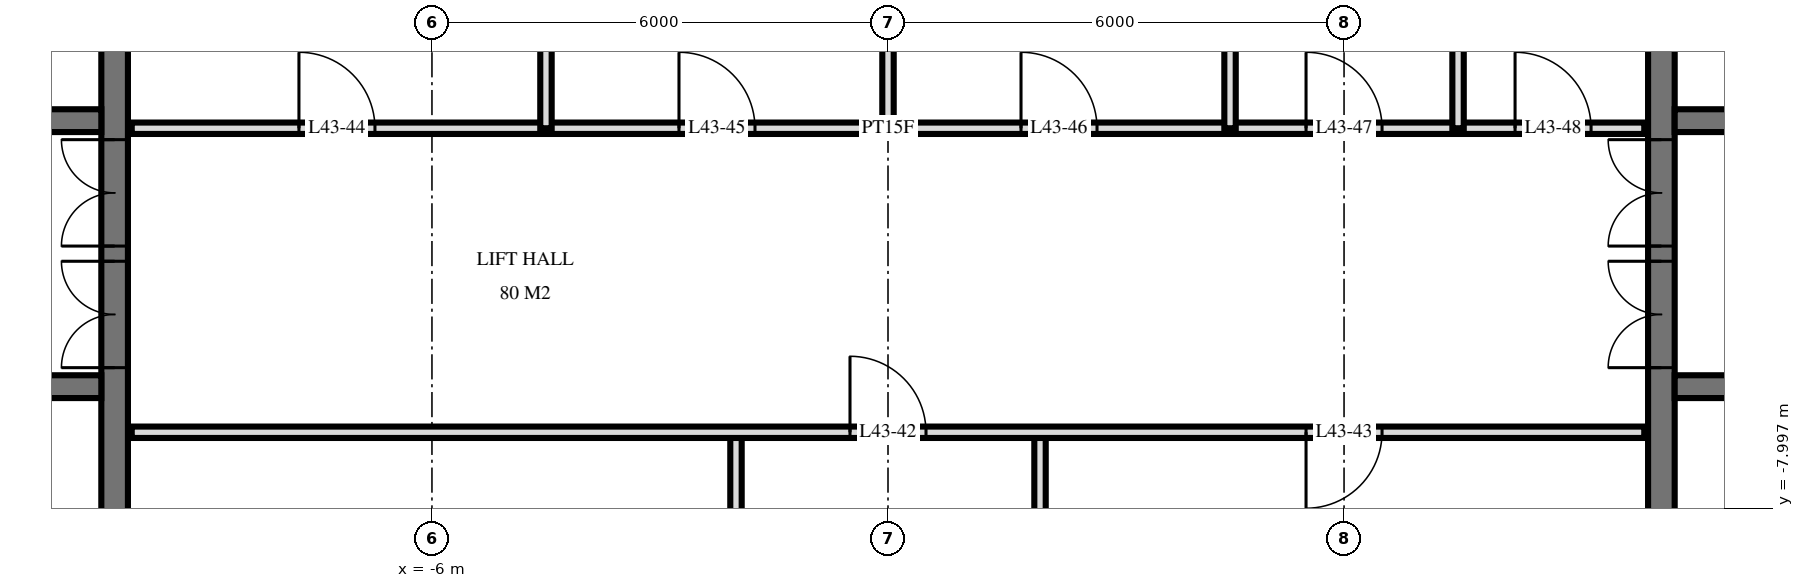
"""IFC4 building model, lengths in metres.
Left out: names, types, materials, properties, quantities, classifications, styles, units other than length and angle.
Written with IfcOpenShell. Run it as: python <this file> out.ifc"""

import sys

from ifc_helpers import new_model, si_unit, direction, frame, frame_2d, origin, place, context, subcontext, project, spatial, rectangle, extrude, element, fill, save


model = new_model("IFC4")
c1 = context("Model", 3, precision=1e-05, world=origin(), true_north=direction((0.0, 1.0)))
c2 = subcontext(c1, "Body", "Model", "MODEL_VIEW")
j1 = project(units=[si_unit("LENGTHUNIT", "METRE"), si_unit("PLANEANGLEUNIT", "RADIAN")], contexts=[c1])
p1 = place(None, origin())
s1 = spatial("IfcSite", under=j1, at=p1, CompositionType="ELEMENT")
p2 = place(p1, origin())
s2 = spatial("IfcBuilding", under=s1, at=p2, CompositionType="ELEMENT")
p3 = place(p2, frame((0.0, 0.0, 166.8)))
s3 = spatial("IfcBuildingStorey", under=s2, at=p3, CompositionType="ELEMENT", Elevation=166.8)
p4 = place(p3, frame((-10.175, -14.55, 0.0), z_axis=(0.0, 0.0, 1.0), x_axis=(0.0, 1.0, 0.0)))
e1 = element("IfcWall", 1, at=p4, inside=s3, PredefinedType="SHEAR", context=c2, shape_type="SweptSolid", body=[
    extrude(rectangle(XDim=14.1, YDim=0.35, at=frame_2d((7.05, 0.0))), origin(), (0.0, 0.0, 1.0), 3.6),
])
p5 = place(p4, frame((8.4, 0.0, 0.0)))
e2 = element("IfcOpeningElement", 2, at=p5, cuts=e1, PredefinedType="OPENING", context=c2, shape_type="SweptSolid", body=[
    extrude(rectangle(XDim=1.4, YDim=2.4, at=frame_2d((0.7, 1.2))), frame((0.0, 0.185, 0.0), z_axis=(0.0, -1.0, 0.0), x_axis=(1.0, 0.0, 0.0)), (0.0, 0.0, 1.0), 0.37),
])
p6 = place(p4, frame((10.0, 0.0, 0.0)))
e3 = element("IfcOpeningElement", 3, at=p6, cuts=e1, PredefinedType="OPENING", context=c2, shape_type="SweptSolid", body=[
    extrude(rectangle(XDim=1.4, YDim=2.4, at=frame_2d((0.7, 1.2))), frame((0.0, 0.185, 0.0), z_axis=(0.0, -1.0, 0.0), x_axis=(1.0, 0.0, 0.0)), (0.0, 0.0, 1.0), 0.37),
])
p7 = place(p4, frame((4.0, 0.0, 0.0)))
e4 = element("IfcOpeningElement", 4, at=p7, cuts=e1, PredefinedType="OPENING", context=c2, shape_type="SweptSolid", body=[
    extrude(rectangle(XDim=1.2, YDim=2.1, at=frame_2d((0.6, 1.05))), frame((0.0, 0.185, 0.0), z_axis=(0.0, -1.0, 0.0), x_axis=(1.0, 0.0, 0.0)), (0.0, 0.0, 1.0), 0.37),
])
p8 = place(p3, frame((-24.05, -2.9, 0.0), z_axis=(0.0, 0.0, 1.0), x_axis=(1.0, 0.0, 0.0)))
e5 = element("IfcWall", 5, at=p8, inside=s3, PredefinedType="SHEAR", context=c2, shape_type="SweptSolid", body=[
    extrude(rectangle(XDim=13.7, YDim=0.3, at=frame_2d((6.85, 0.0))), origin(), (0.0, 0.0, 1.0), 3.6),
])
p9 = place(p8, frame((0.55, 0.0, 0.0)))
e6 = element("IfcOpeningElement", 6, at=p9, cuts=e5, PredefinedType="OPENING", context=c2, shape_type="SweptSolid", body=[
    extrude(rectangle(XDim=1.1, YDim=2.1, at=frame_2d((0.55, 1.05))), frame((0.0, 0.16, 0.0), z_axis=(0.0, -1.0, 0.0), x_axis=(1.0, 0.0, 0.0)), (0.0, 0.0, 1.0), 0.32),
])
p10 = place(p8, frame((6.863, 0.0, 0.0)))
e7 = element("IfcOpeningElement", 7, at=p10, cuts=e5, PredefinedType="OPENING", context=c2, shape_type="SweptSolid", body=[
    extrude(rectangle(XDim=0.9, YDim=2.1, at=frame_2d((0.45, 1.05))), frame((0.0, 0.16, 0.0), z_axis=(0.0, -1.0, 0.0), x_axis=(1.0, 0.0, 0.0)), (0.0, 0.0, 1.0), 0.32),
])
p11 = place(p8, frame((5.438, 0.0, 0.0)))
e8 = element("IfcOpeningElement", 8, at=p11, cuts=e5, PredefinedType="OPENING", context=c2, shape_type="SweptSolid", body=[
    extrude(rectangle(XDim=0.9, YDim=2.1, at=frame_2d((0.45, 1.05))), frame((0.0, 0.16, 0.0), z_axis=(0.0, -1.0, 0.0), x_axis=(1.0, 0.0, 0.0)), (0.0, 0.0, 1.0), 0.32),
])
p12 = place(p8, frame((11.85, 0.0, 0.0)))
e9 = element("IfcOpeningElement", 9, at=p12, cuts=e5, PredefinedType="OPENING", context=c2, shape_type="SweptSolid", body=[
    extrude(rectangle(XDim=1.0, YDim=2.1, at=frame_2d((0.5, 1.05))), frame((0.0, 0.16, 0.0), z_axis=(0.0, -1.0, 0.0), x_axis=(1.0, 0.0, 0.0)), (0.0, 0.0, 1.0), 0.32),
])
p13 = place(p8, frame((9.562, 0.0, 0.0)))
e10 = element("IfcOpeningElement", 10, at=p13, cuts=e5, PredefinedType="OPENING", context=c2, shape_type="SweptSolid", body=[
    extrude(rectangle(XDim=1.0, YDim=2.1, at=frame_2d((0.5, 1.05))), frame((0.0, 0.16, 0.0), z_axis=(0.0, -1.0, 0.0), x_axis=(1.0, 0.0, 0.0)), (0.0, 0.0, 1.0), 0.32),
])
p14 = place(p8, frame((8.137, 0.0, 0.0)))
e11 = element("IfcOpeningElement", 11, at=p14, cuts=e5, PredefinedType="OPENING", context=c2, shape_type="SweptSolid", body=[
    extrude(rectangle(XDim=1.0, YDim=2.1, at=frame_2d((0.5, 1.05))), frame((0.0, 0.16, 0.0), z_axis=(0.0, -1.0, 0.0), x_axis=(1.0, 0.0, 0.0)), (0.0, 0.0, 1.0), 0.32),
])
p15 = place(p8, frame((3.0, 0.0, 0.0)))
e12 = element("IfcOpeningElement", 12, at=p15, cuts=e5, PredefinedType="OPENING", context=c2, shape_type="SweptSolid", body=[
    extrude(rectangle(XDim=1.0, YDim=2.1, at=frame_2d((0.5, 1.05))), frame((0.0, 0.16, 0.0), z_axis=(0.0, -1.0, 0.0), x_axis=(1.0, 0.0, 0.0)), (0.0, 0.0, 1.0), 0.32),
])
p16 = place(p3, frame((-24.05, -6.4, 0.0), z_axis=(0.0, 0.0, 1.0), x_axis=(1.0, 0.0, 0.0)))
e13 = element("IfcWall", 13, at=p16, inside=s3, PredefinedType="SHEAR", context=c2, shape_type="SweptSolid", body=[
    extrude(rectangle(XDim=13.7, YDim=0.3, at=frame_2d((6.85, 0.0))), origin(), (0.0, 0.0, 1.0), 3.6),
])
p17 = place(p16, frame((0.55, 0.0, 0.0)))
e14 = element("IfcOpeningElement", 14, at=p17, cuts=e13, PredefinedType="OPENING", context=c2, shape_type="SweptSolid", body=[
    extrude(rectangle(XDim=1.1, YDim=2.1, at=frame_2d((0.55, 1.05))), frame((0.0, 0.16, 0.0), z_axis=(0.0, -1.0, 0.0), x_axis=(1.0, 0.0, 0.0)), (0.0, 0.0, 1.0), 0.32),
])
p18 = place(p16, frame((5.8, 0.0, 0.0)))
e15 = element("IfcOpeningElement", 15, at=p18, cuts=e13, PredefinedType="OPENING", context=c2, shape_type="SweptSolid", body=[
    extrude(rectangle(XDim=1.1, YDim=2.1, at=frame_2d((0.55, 1.05))), frame((0.0, 0.16, 0.0), z_axis=(0.0, -1.0, 0.0), x_axis=(1.0, 0.0, 0.0)), (0.0, 0.0, 1.0), 0.32),
])
p19 = place(p3, frame((10.175, -14.55, 0.0), z_axis=(0.0, 0.0, 1.0), x_axis=(0.0, 1.0, 0.0)))
e16 = element("IfcWall", 16, at=p19, inside=s3, PredefinedType="SHEAR", context=c2, shape_type="SweptSolid", body=[
    extrude(rectangle(XDim=14.1, YDim=0.35, at=frame_2d((7.05, 0.0))), origin(), (0.0, 0.0, 1.0), 3.6),
])
p20 = place(p19, frame((8.4, 0.0, 0.0)))
e17 = element("IfcOpeningElement", 17, at=p20, cuts=e16, PredefinedType="OPENING", context=c2, shape_type="SweptSolid", body=[
    extrude(rectangle(XDim=1.4, YDim=2.4, at=frame_2d((0.7, 1.2))), frame((0.0, 0.185, 0.0), z_axis=(0.0, -1.0, 0.0), x_axis=(1.0, 0.0, 0.0)), (0.0, 0.0, 1.0), 0.37),
])
p21 = place(p19, frame((10.0, 0.0, 0.0)))
e18 = element("IfcOpeningElement", 18, at=p21, cuts=e16, PredefinedType="OPENING", context=c2, shape_type="SweptSolid", body=[
    extrude(rectangle(XDim=1.4, YDim=2.4, at=frame_2d((0.7, 1.2))), frame((0.0, 0.185, 0.0), z_axis=(0.0, -1.0, 0.0), x_axis=(1.0, 0.0, 0.0)), (0.0, 0.0, 1.0), 0.37),
])
p22 = place(p19, frame((4.0, 0.0, 0.0)))
e19 = element("IfcOpeningElement", 19, at=p22, cuts=e16, PredefinedType="OPENING", context=c2, shape_type="SweptSolid", body=[
    extrude(rectangle(XDim=1.2, YDim=2.1, at=frame_2d((0.6, 1.05))), frame((0.0, 0.185, 0.0), z_axis=(0.0, -1.0, 0.0), x_axis=(1.0, 0.0, 0.0)), (0.0, 0.0, 1.0), 0.37),
])
p23 = place(p3, frame((10.35, -2.9, 0.0), z_axis=(0.0, 0.0, 1.0), x_axis=(1.0, 0.0, 0.0)))
e20 = element("IfcWall", 20, at=p23, inside=s3, PredefinedType="SHEAR", context=c2, shape_type="SweptSolid", body=[
    extrude(rectangle(XDim=13.7, YDim=0.3, at=frame_2d((6.85, 0.0))), origin(), (0.0, 0.0, 1.0), 3.6),
])
p24 = place(p23, frame((12.05, 0.0, 0.0)))
e21 = element("IfcOpeningElement", 21, at=p24, cuts=e20, PredefinedType="OPENING", context=c2, shape_type="SweptSolid", body=[
    extrude(rectangle(XDim=1.1, YDim=2.1, at=frame_2d((0.55, 1.05))), frame((0.0, 0.16, 0.0), z_axis=(0.0, -1.0, 0.0), x_axis=(1.0, 0.0, 0.0)), (0.0, 0.0, 1.0), 0.32),
])
p25 = place(p23, frame((5.938, 0.0, 0.0)))
e22 = element("IfcOpeningElement", 22, at=p25, cuts=e20, PredefinedType="OPENING", context=c2, shape_type="SweptSolid", body=[
    extrude(rectangle(XDim=0.9, YDim=2.1, at=frame_2d((0.45, 1.05))), frame((0.0, 0.16, 0.0), z_axis=(0.0, -1.0, 0.0), x_axis=(1.0, 0.0, 0.0)), (0.0, 0.0, 1.0), 0.32),
])
p26 = place(p23, frame((7.363, 0.0, 0.0)))
e23 = element("IfcOpeningElement", 23, at=p26, cuts=e20, PredefinedType="OPENING", context=c2, shape_type="SweptSolid", body=[
    extrude(rectangle(XDim=0.9, YDim=2.1, at=frame_2d((0.45, 1.05))), frame((0.0, 0.16, 0.0), z_axis=(0.0, -1.0, 0.0), x_axis=(1.0, 0.0, 0.0)), (0.0, 0.0, 1.0), 0.32),
])
p27 = place(p23, frame((0.85, 0.0, 0.0)))
e24 = element("IfcOpeningElement", 24, at=p27, cuts=e20, PredefinedType="OPENING", context=c2, shape_type="SweptSolid", body=[
    extrude(rectangle(XDim=1.0, YDim=2.1, at=frame_2d((0.5, 1.05))), frame((0.0, 0.16, 0.0), z_axis=(0.0, -1.0, 0.0), x_axis=(1.0, 0.0, 0.0)), (0.0, 0.0, 1.0), 0.32),
])
p28 = place(p23, frame((3.137, 0.0, 0.0)))
e25 = element("IfcOpeningElement", 25, at=p28, cuts=e20, PredefinedType="OPENING", context=c2, shape_type="SweptSolid", body=[
    extrude(rectangle(XDim=1.0, YDim=2.1, at=frame_2d((0.5, 1.05))), frame((0.0, 0.16, 0.0), z_axis=(0.0, -1.0, 0.0), x_axis=(1.0, 0.0, 0.0)), (0.0, 0.0, 1.0), 0.32),
])
p29 = place(p23, frame((4.562, 0.0, 0.0)))
e26 = element("IfcOpeningElement", 26, at=p29, cuts=e20, PredefinedType="OPENING", context=c2, shape_type="SweptSolid", body=[
    extrude(rectangle(XDim=1.0, YDim=2.1, at=frame_2d((0.5, 1.05))), frame((0.0, 0.16, 0.0), z_axis=(0.0, -1.0, 0.0), x_axis=(1.0, 0.0, 0.0)), (0.0, 0.0, 1.0), 0.32),
])
p30 = place(p23, frame((9.7, 0.0, 0.0)))
e27 = element("IfcOpeningElement", 27, at=p30, cuts=e20, PredefinedType="OPENING", context=c2, shape_type="SweptSolid", body=[
    extrude(rectangle(XDim=1.0, YDim=2.1, at=frame_2d((0.5, 1.05))), frame((0.0, 0.16, 0.0), z_axis=(0.0, -1.0, 0.0), x_axis=(1.0, 0.0, 0.0)), (0.0, 0.0, 1.0), 0.32),
])
p31 = place(p3, frame((10.35, -6.4, 0.0), z_axis=(0.0, 0.0, 1.0), x_axis=(1.0, 0.0, 0.0)))
e28 = element("IfcWall", 28, at=p31, inside=s3, PredefinedType="SHEAR", context=c2, shape_type="SweptSolid", body=[
    extrude(rectangle(XDim=13.7, YDim=0.3, at=frame_2d((6.85, 0.0))), origin(), (0.0, 0.0, 1.0), 3.6),
])
p32 = place(p31, frame((12.05, 0.0, 0.0)))
e29 = element("IfcOpeningElement", 29, at=p32, cuts=e28, PredefinedType="OPENING", context=c2, shape_type="SweptSolid", body=[
    extrude(rectangle(XDim=1.1, YDim=2.1, at=frame_2d((0.55, 1.05))), frame((0.0, 0.16, 0.0), z_axis=(0.0, -1.0, 0.0), x_axis=(1.0, 0.0, 0.0)), (0.0, 0.0, 1.0), 0.32),
])
p33 = place(p31, frame((6.8, 0.0, 0.0)))
e30 = element("IfcOpeningElement", 30, at=p33, cuts=e28, PredefinedType="OPENING", context=c2, shape_type="SweptSolid", body=[
    extrude(rectangle(XDim=1.1, YDim=2.1, at=frame_2d((0.55, 1.05))), frame((0.0, 0.16, 0.0), z_axis=(0.0, -1.0, 0.0), x_axis=(1.0, 0.0, 0.0)), (0.0, 0.0, 1.0), 0.32),
])
for number, where, z_axis, x_axis in (
    (31, (7.5, -3.0, 0.0), (0.0, 0.0, 1.0), (0.0, 1.0, 0.0)),
    (32, (4.5, -3.0, 0.0), (0.0, 0.0, 1.0), (0.0, 1.0, 0.0)),
):
    element("IfcWall", number, at=place(p3, frame(where, z_axis=z_axis, x_axis=x_axis)), inside=s3, PredefinedType="PLUMBINGWALL", context=c2, shape_type="SweptSolid", body=[
        extrude(rectangle(XDim=4.02, YDim=0.15, at=frame_2d((2.01, 0.0))), origin(), (0.0, 0.0, 1.0), 3.32),
    ])
p34 = place(p3, frame((2.0, -11.0, 0.0), z_axis=(0.0, 0.0, 1.0), x_axis=(0.0, 1.0, 0.0)))
e33 = element("IfcWall", 33, at=p34, inside=s3, PredefinedType="PARTITIONING", context=c2, shape_type="SweptSolid", body=[
    extrude(rectangle(XDim=4.0, YDim=0.15, at=frame_2d((2.0, 0.0))), origin(), (0.0, 0.0, 1.0), 3.32),
])
p35 = place(p3, frame((0.0, -3.0, 0.0), z_axis=(0.0, 0.0, 1.0), x_axis=(0.0, 1.0, 0.0)))
e34 = element("IfcWall", 34, at=p35, inside=s3, PredefinedType="PARTITIONING", context=c2, shape_type="SweptSolid", body=[
    extrude(rectangle(XDim=4.02, YDim=0.15, at=frame_2d((2.01, 0.0))), origin(), (0.0, 0.0, 1.0), 3.32),
])
p36 = place(p3, frame((-2.0, -11.0, 0.0), z_axis=(0.0, 0.0, 1.0), x_axis=(0.0, 1.0, 0.0)))
e35 = element("IfcWall", 35, at=p36, inside=s3, PredefinedType="PARTITIONING", context=c2, shape_type="SweptSolid", body=[
    extrude(rectangle(XDim=4.0, YDim=0.15, at=frame_2d((2.0, 0.0))), origin(), (0.0, 0.0, 1.0), 3.32),
])
p37 = place(p3, frame((-4.5, -3.0, 0.0), z_axis=(0.0, 0.0, 1.0), x_axis=(0.0, 1.0, 0.0)))
e36 = element("IfcWall", 36, at=p37, inside=s3, PredefinedType="PARTITIONING", context=c2, shape_type="SweptSolid", body=[
    extrude(rectangle(XDim=4.02, YDim=0.15, at=frame_2d((2.01, 0.0))), origin(), (0.0, 0.0, 1.0), 3.32),
])
p38 = place(p3, frame((-9.95, -7.0, 0.0), z_axis=(0.0, 0.0, 1.0), x_axis=(1.0, 0.0, 0.0)))
e37 = element("IfcWall", 37, at=p38, inside=s3, PredefinedType="PARTITIONING", context=c2, shape_type="SweptSolid", body=[
    extrude(rectangle(XDim=19.9, YDim=0.15, at=frame_2d((9.95, 0.0))), origin(), (0.0, 0.0, 1.0), 3.32),
])
p39 = place(p38, frame((9.45, 0.0, 0.0)))
e38 = element("IfcOpeningElement", 38, at=p39, cuts=e37, PredefinedType="OPENING", context=c2, shape_type="SweptSolid", body=[
    extrude(rectangle(XDim=1.0, YDim=2.1, at=frame_2d((0.5, 1.05))), frame((0.0, 0.085, 0.0), z_axis=(0.0, -1.0, 0.0), x_axis=(1.0, 0.0, 0.0)), (0.0, 0.0, 1.0), 0.17),
])
p40 = place(p38, frame((15.45, 0.0, 0.0)))
e39 = element("IfcOpeningElement", 39, at=p40, cuts=e37, PredefinedType="OPENING", context=c2, shape_type="SweptSolid", body=[
    extrude(rectangle(XDim=1.0, YDim=2.1, at=frame_2d((0.5, 1.05))), frame((0.0, 0.085, 0.0), z_axis=(0.0, -1.0, 0.0), x_axis=(1.0, 0.0, 0.0)), (0.0, 0.0, 1.0), 0.17),
])
p41 = place(p3, frame((-9.95, -3.0, 0.0), z_axis=(0.0, 0.0, 1.0), x_axis=(1.0, 0.0, 0.0)))
e40 = element("IfcWall", 40, at=p41, inside=s3, PredefinedType="PARTITIONING", context=c2, shape_type="SweptSolid", body=[
    extrude(rectangle(XDim=19.9, YDim=0.15, at=frame_2d((9.95, 0.0))), origin(), (0.0, 0.0, 1.0), 3.32),
])
p42 = place(p41, frame((2.2, 0.0, 0.0)))
e41 = element("IfcOpeningElement", 41, at=p42, cuts=e40, PredefinedType="OPENING", context=c2, shape_type="SweptSolid", body=[
    extrude(rectangle(XDim=1.0, YDim=2.1, at=frame_2d((0.5, 1.05))), frame((0.0, 0.085, 0.0), z_axis=(0.0, -1.0, 0.0), x_axis=(1.0, 0.0, 0.0)), (0.0, 0.0, 1.0), 0.17),
])
p43 = place(p41, frame((7.2, 0.0, 0.0)))
e42 = element("IfcOpeningElement", 42, at=p43, cuts=e40, PredefinedType="OPENING", context=c2, shape_type="SweptSolid", body=[
    extrude(rectangle(XDim=1.0, YDim=2.1, at=frame_2d((0.5, 1.05))), frame((0.0, 0.085, 0.0), z_axis=(0.0, -1.0, 0.0), x_axis=(1.0, 0.0, 0.0)), (0.0, 0.0, 1.0), 0.17),
])
p44 = place(p41, frame((11.7, 0.0, 0.0)))
e43 = element("IfcOpeningElement", 43, at=p44, cuts=e40, PredefinedType="OPENING", context=c2, shape_type="SweptSolid", body=[
    extrude(rectangle(XDim=1.0, YDim=2.1, at=frame_2d((0.5, 1.05))), frame((0.0, 0.085, 0.0), z_axis=(0.0, -1.0, 0.0), x_axis=(1.0, 0.0, 0.0)), (0.0, 0.0, 1.0), 0.17),
])
p45 = place(p41, frame((15.45, 0.0, 0.0)))
e44 = element("IfcOpeningElement", 44, at=p45, cuts=e40, PredefinedType="OPENING", context=c2, shape_type="SweptSolid", body=[
    extrude(rectangle(XDim=1.0, YDim=2.1, at=frame_2d((0.5, 1.05))), frame((0.0, 0.085, 0.0), z_axis=(0.0, -1.0, 0.0), x_axis=(1.0, 0.0, 0.0)), (0.0, 0.0, 1.0), 0.17),
])
p46 = place(p41, frame((18.2, 0.0, 0.0)))
e45 = element("IfcOpeningElement", 45, at=p46, cuts=e40, PredefinedType="OPENING", context=c2, shape_type="SweptSolid", body=[
    extrude(rectangle(XDim=1.0, YDim=2.1, at=frame_2d((0.5, 1.05))), frame((0.0, 0.085, 0.0), z_axis=(0.0, -1.0, 0.0), x_axis=(1.0, 0.0, 0.0)), (0.0, 0.0, 1.0), 0.17),
])
p47 = place(p5, origin())
e46 = element("IfcDoor", 46, at=p47, inside=s3, OperationType="DOUBLE_DOOR_SINGLE_SWING", PredefinedType="DOOR", context=c2, shape_type="SweptSolid", body=[
    extrude(rectangle(XDim=1.4, YDim=2.4, at=frame_2d((0.7, 1.2))), frame((0.0, 0.025, 0.0), z_axis=(0.0, -1.0, 0.0), x_axis=(1.0, 0.0, 0.0)), (0.0, 0.0, 1.0), 0.05),
])
fill(e2, e46)
p48 = place(p6, origin())
e47 = element("IfcDoor", 47, at=p48, inside=s3, OperationType="DOUBLE_DOOR_SINGLE_SWING", PredefinedType="DOOR", context=c2, shape_type="SweptSolid", body=[
    extrude(rectangle(XDim=1.4, YDim=2.4, at=frame_2d((0.7, 1.2))), frame((0.0, 0.025, 0.0), z_axis=(0.0, -1.0, 0.0), x_axis=(1.0, 0.0, 0.0)), (0.0, 0.0, 1.0), 0.05),
])
fill(e3, e47)
p49 = place(p20, origin())
e48 = element("IfcDoor", 48, at=p49, inside=s3, OperationType="DOUBLE_DOOR_SINGLE_SWING", PredefinedType="DOOR", context=c2, shape_type="SweptSolid", body=[
    extrude(rectangle(XDim=1.4, YDim=2.4, at=frame_2d((0.7, 1.2))), frame((0.0, 0.025, 0.0), z_axis=(0.0, -1.0, 0.0), x_axis=(1.0, 0.0, 0.0)), (0.0, 0.0, 1.0), 0.05),
])
fill(e17, e48)
p50 = place(p21, origin())
e49 = element("IfcDoor", 49, at=p50, inside=s3, OperationType="DOUBLE_DOOR_SINGLE_SWING", PredefinedType="DOOR", context=c2, shape_type="SweptSolid", body=[
    extrude(rectangle(XDim=1.4, YDim=2.4, at=frame_2d((0.7, 1.2))), frame((0.0, 0.025, 0.0), z_axis=(0.0, -1.0, 0.0), x_axis=(1.0, 0.0, 0.0)), (0.0, 0.0, 1.0), 0.05),
])
fill(e18, e49)
p51 = place(p39, origin())
e50 = element("IfcDoor", 50, at=p51, inside=s3, OperationType="SINGLE_SWING_RIGHT", PredefinedType="DOOR", context=c2, shape_type="SweptSolid", body=[
    extrude(rectangle(XDim=1.0, YDim=2.1, at=frame_2d((0.5, 1.05))), frame((0.0, 0.025, 0.0), z_axis=(0.0, -1.0, 0.0), x_axis=(1.0, 0.0, 0.0)), (0.0, 0.0, 1.0), 0.05),
])
fill(e38, e50)
p52 = place(p40, frame((0.5, 0.0, 0.0), z_axis=(0.0, 0.0, 1.0), x_axis=(-1.0, 0.0, 0.0)))
e51 = element("IfcDoor", 51, at=p52, inside=s3, OperationType="SINGLE_SWING_LEFT", PredefinedType="DOOR", context=c2, shape_type="SweptSolid", body=[
    extrude(rectangle(XDim=1.0, YDim=2.1, at=frame_2d((0.0, 1.05))), frame((0.0, -0.025, 0.0), z_axis=(0.0, 1.0, 0.0), x_axis=(-1.0, 0.0, 0.0)), (0.0, 0.0, 1.0), 0.05),
])
fill(e39, e51)
p53 = place(p42, origin())
e52 = element("IfcDoor", 52, at=p53, inside=s3, OperationType="SINGLE_SWING_RIGHT", PredefinedType="DOOR", context=c2, shape_type="SweptSolid", body=[
    extrude(rectangle(XDim=1.0, YDim=2.1, at=frame_2d((0.5, 1.05))), frame((0.0, 0.025, 0.0), z_axis=(0.0, -1.0, 0.0), x_axis=(1.0, 0.0, 0.0)), (0.0, 0.0, 1.0), 0.05),
])
fill(e41, e52)
p54 = place(p43, origin())
e53 = element("IfcDoor", 53, at=p54, inside=s3, OperationType="SINGLE_SWING_RIGHT", PredefinedType="DOOR", context=c2, shape_type="SweptSolid", body=[
    extrude(rectangle(XDim=1.0, YDim=2.1, at=frame_2d((0.5, 1.05))), frame((0.0, 0.025, 0.0), z_axis=(0.0, -1.0, 0.0), x_axis=(1.0, 0.0, 0.0)), (0.0, 0.0, 1.0), 0.05),
])
fill(e42, e53)
p55 = place(p44, origin())
e54 = element("IfcDoor", 54, at=p55, inside=s3, OperationType="SINGLE_SWING_RIGHT", PredefinedType="DOOR", context=c2, shape_type="SweptSolid", body=[
    extrude(rectangle(XDim=1.0, YDim=2.1, at=frame_2d((0.5, 1.05))), frame((0.0, 0.025, 0.0), z_axis=(0.0, -1.0, 0.0), x_axis=(1.0, 0.0, 0.0)), (0.0, 0.0, 1.0), 0.05),
])
fill(e43, e54)
p56 = place(p45, origin())
e55 = element("IfcDoor", 55, at=p56, inside=s3, OperationType="SINGLE_SWING_RIGHT", PredefinedType="DOOR", context=c2, shape_type="SweptSolid", body=[
    extrude(rectangle(XDim=1.0, YDim=2.1, at=frame_2d((0.5, 1.05))), frame((0.0, 0.025, 0.0), z_axis=(0.0, -1.0, 0.0), x_axis=(1.0, 0.0, 0.0)), (0.0, 0.0, 1.0), 0.05),
])
fill(e44, e55)
p57 = place(p46, origin())
e56 = element("IfcDoor", 56, at=p57, inside=s3, OperationType="SINGLE_SWING_RIGHT", PredefinedType="DOOR", context=c2, shape_type="SweptSolid", body=[
    extrude(rectangle(XDim=1.0, YDim=2.1, at=frame_2d((0.5, 1.05))), frame((0.0, 0.025, 0.0), z_axis=(0.0, -1.0, 0.0), x_axis=(1.0, 0.0, 0.0)), (0.0, 0.0, 1.0), 0.05),
])
fill(e45, e56)
save(model, sys.argv[1])
